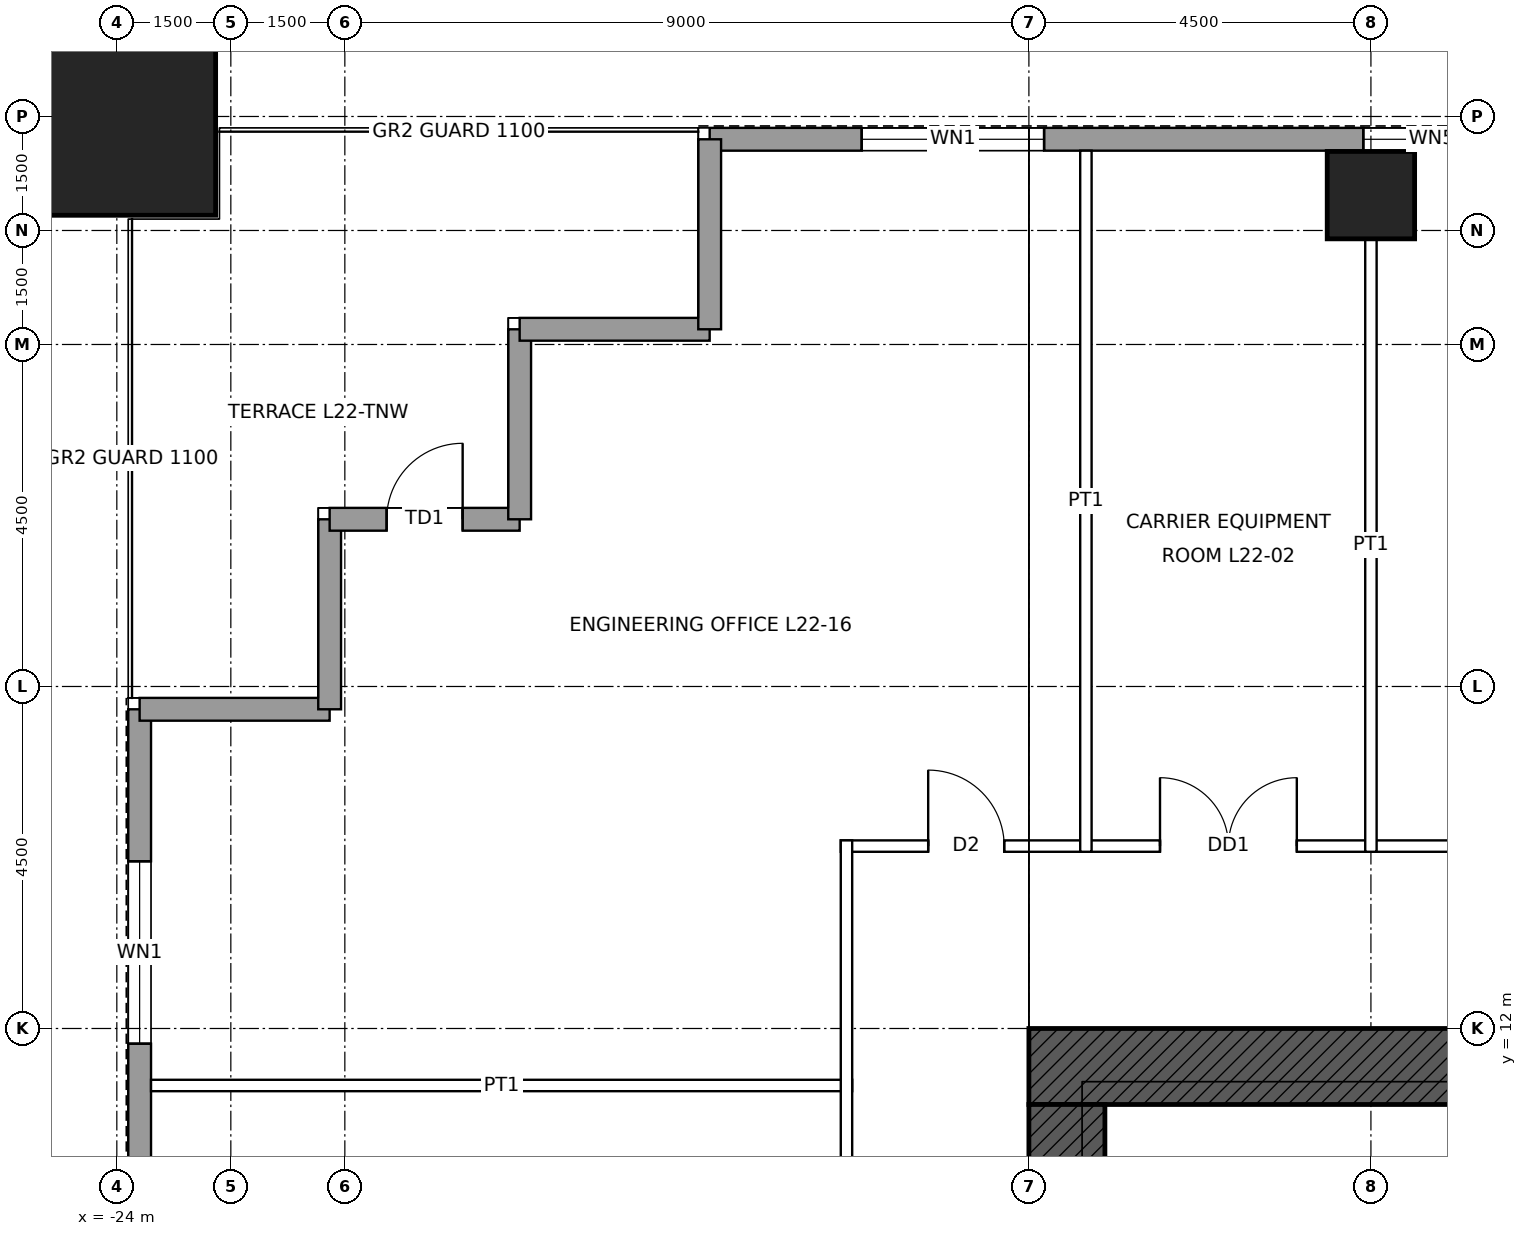
"""IFC4 building model, lengths in metres.
Left out: names, types, materials, properties, quantities, classifications, styles, units other than length and angle.
Written with IfcOpenShell. Run it as: python <this file> out.ifc"""

import sys

from ifc_helpers import new_model, si_unit, direction, frame, frame_2d, origin, origin_2d, place, context, subcontext, project, spatial, rectangle, hollow_rectangle, extrude, element, fill, save


model = new_model("IFC4")
c1 = context("Model", 3, precision=1e-05, world=origin(), true_north=direction((0.0, 1.0)))
c2 = subcontext(c1, "Body", "Model", "MODEL_VIEW")
j1 = project(units=[si_unit("LENGTHUNIT", "METRE"), si_unit("PLANEANGLEUNIT", "RADIAN")], contexts=[c1])
p1 = place(None, origin())
s1 = spatial("IfcSite", under=j1, at=p1, CompositionType="ELEMENT")
p2 = place(p1, origin())
s2 = spatial("IfcBuilding", under=s1, at=p2, CompositionType="ELEMENT")
p3 = place(p2, frame((0.0, 0.0, 113.4)))
s3 = spatial("IfcBuildingStorey", under=s2, at=p3, CompositionType="ELEMENT", Elevation=113.4)
p4 = place(p3, frame((-24.0, 24.0, 0.0), z_axis=(0.0, 0.0, 1.0), x_axis=(1.0, 0.0, 0.0)))
e1 = element("IfcColumn", 1, at=p4, inside=s3, PredefinedType="COLUMN", context=c2, shape_type="SweptSolid", body=[
    extrude(hollow_rectangle(XDim=2.6, YDim=2.6, WallThickness=0.13, at=origin_2d()), origin(), (0.0, 0.0, 1.0), 4.5),
])
p5 = place(p3, frame((-7.5, 22.965, 0.0), z_axis=(0.0, 0.0, 1.0), x_axis=(1.0, 0.0, 0.0)))
e2 = element("IfcColumn", 2, at=p5, inside=s3, PredefinedType="COLUMN", context=c2, shape_type="SweptSolid", body=[
    extrude(hollow_rectangle(XDim=1.15, YDim=1.15, WallThickness=0.075, at=origin_2d()), origin(), (0.0, 0.0, 1.0), 4.5),
])
p6 = place(p3, frame((-12.0, 11.5, 0.0), z_axis=(0.0, 0.0, 1.0), x_axis=(1.0, 0.0, 0.0)))
e3 = element("IfcWall", 3, at=p6, inside=s3, PredefinedType="SHEAR", context=c2, shape_type="SweptSolid", body=[
    extrude(rectangle(XDim=24.0, YDim=1.0, at=frame_2d((12.0, 0.0))), origin(), (0.0, 0.0, 1.0), 4.5),
])
p7 = place(p6, frame((6.25, 0.0, 0.0)))
e4 = element("IfcOpeningElement", 4, at=p7, cuts=e3, PredefinedType="OPENING", context=c2, shape_type="SweptSolid", body=[
    extrude(rectangle(XDim=1.0, YDim=2.4, at=frame_2d((0.5, 1.2))), frame((0.0, 0.51, 0.0), z_axis=(0.0, -1.0, 0.0), x_axis=(1.0, 0.0, 0.0)), (0.0, 0.0, 1.0), 1.02),
])
p8 = place(p6, frame((16.75, 0.0, 0.0)))
e5 = element("IfcOpeningElement", 5, at=p8, cuts=e3, PredefinedType="OPENING", context=c2, shape_type="SweptSolid", body=[
    extrude(rectangle(XDim=1.0, YDim=2.4, at=frame_2d((0.5, 1.2))), frame((0.0, 0.51, 0.0), z_axis=(0.0, -1.0, 0.0), x_axis=(1.0, 0.0, 0.0)), (0.0, 0.0, 1.0), 1.02),
])
p9 = place(p3, frame((-11.5, -11.0, 0.0), z_axis=(0.0, 0.0, 1.0), x_axis=(0.0, 1.0, 0.0)))
e6 = element("IfcWall", 6, at=p9, inside=s3, PredefinedType="SHEAR", context=c2, shape_type="SweptSolid", body=[
    extrude(rectangle(XDim=22.0, YDim=1.0, at=frame_2d((11.0, 0.0))), origin(), (0.0, 0.0, 1.0), 4.5),
])
p10 = place(p9, frame((10.5, 0.0, 0.0)))
e7 = element("IfcOpeningElement", 7, at=p10, cuts=e6, PredefinedType="OPENING", context=c2, shape_type="SweptSolid", body=[
    extrude(rectangle(XDim=1.0, YDim=2.4, at=frame_2d((0.5, 1.2))), frame((0.0, 0.51, 0.0), z_axis=(0.0, -1.0, 0.0), x_axis=(1.0, 0.0, 0.0)), (0.0, 0.0, 1.0), 1.02),
])
p11 = place(p3, frame((-16.2, 23.7, 0.0), z_axis=(0.0, 0.0, 1.0), x_axis=(1.0, 0.0, 0.0)))
e8 = element("IfcWall", 8, at=p11, inside=s3, PredefinedType="SOLIDWALL", context=c2, shape_type="SweptSolid", body=[
    extrude(rectangle(XDim=32.4, YDim=0.3, at=frame_2d((16.2, 0.0))), origin(), (0.0, 0.0, 1.0), 4.3),
])
p12 = place(p11, frame((2.0, 0.0, 1.0)))
e9 = element("IfcOpeningElement", 9, at=p12, cuts=e8, PredefinedType="OPENING", context=c2, shape_type="SweptSolid", body=[
    extrude(rectangle(XDim=2.4, YDim=1.2, at=frame_2d((1.2, 0.6))), frame((0.0, 0.16, 0.0), z_axis=(0.0, -1.0, 0.0), x_axis=(1.0, 0.0, 0.0)), (0.0, 0.0, 1.0), 0.32),
])
p13 = place(p11, frame((8.6, 0.0, 1.0)))
e10 = element("IfcOpeningElement", 10, at=p13, cuts=e8, PredefinedType="OPENING", context=c2, shape_type="SweptSolid", body=[
    extrude(rectangle(XDim=1.8, YDim=1.2, at=frame_2d((0.9, 0.6))), frame((0.0, 0.16, 0.0), z_axis=(0.0, -1.0, 0.0), x_axis=(1.0, 0.0, 0.0)), (0.0, 0.0, 1.0), 0.32),
])
p14 = place(p11, frame((10.7, 0.0, 1.0)))
e11 = element("IfcOpeningElement", 11, at=p14, cuts=e8, PredefinedType="OPENING", context=c2, shape_type="SweptSolid", body=[
    extrude(rectangle(XDim=2.4, YDim=1.2, at=frame_2d((1.2, 0.6))), frame((0.0, 0.16, 0.0), z_axis=(0.0, -1.0, 0.0), x_axis=(1.0, 0.0, 0.0)), (0.0, 0.0, 1.0), 0.32),
])
p15 = place(p11, frame((13.4, 0.0, 1.0)))
e12 = element("IfcOpeningElement", 12, at=p15, cuts=e8, PredefinedType="OPENING", context=c2, shape_type="SweptSolid", body=[
    extrude(rectangle(XDim=2.4, YDim=1.2, at=frame_2d((1.2, 0.6))), frame((0.0, 0.16, 0.0), z_axis=(0.0, -1.0, 0.0), x_axis=(1.0, 0.0, 0.0)), (0.0, 0.0, 1.0), 0.32),
])
p16 = place(p11, frame((16.6, 0.0, 1.0)))
e13 = element("IfcOpeningElement", 13, at=p16, cuts=e8, PredefinedType="OPENING", context=c2, shape_type="SweptSolid", body=[
    extrude(rectangle(XDim=2.4, YDim=1.2, at=frame_2d((1.2, 0.6))), frame((0.0, 0.16, 0.0), z_axis=(0.0, -1.0, 0.0), x_axis=(1.0, 0.0, 0.0)), (0.0, 0.0, 1.0), 0.32),
])
p17 = place(p11, frame((19.3, 0.0, 1.0)))
e14 = element("IfcOpeningElement", 14, at=p17, cuts=e8, PredefinedType="OPENING", context=c2, shape_type="SweptSolid", body=[
    extrude(rectangle(XDim=2.4, YDim=1.2, at=frame_2d((1.2, 0.6))), frame((0.0, 0.16, 0.0), z_axis=(0.0, -1.0, 0.0), x_axis=(1.0, 0.0, 0.0)), (0.0, 0.0, 1.0), 0.32),
])
p18 = place(p11, frame((22.0, 0.0, 1.0)))
e15 = element("IfcOpeningElement", 15, at=p18, cuts=e8, PredefinedType="OPENING", context=c2, shape_type="SweptSolid", body=[
    extrude(rectangle(XDim=1.8, YDim=1.2, at=frame_2d((0.9, 0.6))), frame((0.0, 0.16, 0.0), z_axis=(0.0, -1.0, 0.0), x_axis=(1.0, 0.0, 0.0)), (0.0, 0.0, 1.0), 0.32),
])
p19 = place(p11, frame((28.0, 0.0, 1.0)))
e16 = element("IfcOpeningElement", 16, at=p19, cuts=e8, PredefinedType="OPENING", context=c2, shape_type="SweptSolid", body=[
    extrude(rectangle(XDim=2.4, YDim=1.2, at=frame_2d((1.2, 0.6))), frame((0.0, 0.16, 0.0), z_axis=(0.0, -1.0, 0.0), x_axis=(1.0, 0.0, 0.0)), (0.0, 0.0, 1.0), 0.32),
])
p20 = place(p3, frame((-23.7, -16.2, 0.0), z_axis=(0.0, 0.0, 1.0), x_axis=(0.0, 1.0, 0.0)))
e17 = element("IfcWall", 17, at=p20, inside=s3, PredefinedType="SOLIDWALL", context=c2, shape_type="SweptSolid", body=[
    extrude(rectangle(XDim=32.4, YDim=0.3, at=frame_2d((16.2, 0.0))), origin(), (0.0, 0.0, 1.0), 4.3),
])
p21 = place(p20, frame((0.65, 0.0, 1.0)))
e18 = element("IfcOpeningElement", 18, at=p21, cuts=e17, PredefinedType="OPENING", context=c2, shape_type="SweptSolid", body=[
    extrude(rectangle(XDim=1.8, YDim=1.2, at=frame_2d((0.9, 0.6))), frame((0.0, 0.16, 0.0), z_axis=(0.0, -1.0, 0.0), x_axis=(1.0, 0.0, 0.0)), (0.0, 0.0, 1.0), 0.32),
])
p22 = place(p20, frame((2.75, 0.0, 1.0)))
e19 = element("IfcOpeningElement", 19, at=p22, cuts=e17, PredefinedType="OPENING", context=c2, shape_type="SweptSolid", body=[
    extrude(rectangle(XDim=1.8, YDim=1.2, at=frame_2d((0.9, 0.6))), frame((0.0, 0.16, 0.0), z_axis=(0.0, -1.0, 0.0), x_axis=(1.0, 0.0, 0.0)), (0.0, 0.0, 1.0), 0.32),
])
p23 = place(p20, frame((9.5, 0.0, 1.0)))
e20 = element("IfcOpeningElement", 20, at=p23, cuts=e17, PredefinedType="OPENING", context=c2, shape_type="SweptSolid", body=[
    extrude(rectangle(XDim=2.4, YDim=1.2, at=frame_2d((1.2, 0.6))), frame((0.0, 0.16, 0.0), z_axis=(0.0, -1.0, 0.0), x_axis=(1.0, 0.0, 0.0)), (0.0, 0.0, 1.0), 0.32),
])
p24 = place(p20, frame((13.0, 0.0, 1.0)))
e21 = element("IfcOpeningElement", 21, at=p24, cuts=e17, PredefinedType="OPENING", context=c2, shape_type="SweptSolid", body=[
    extrude(rectangle(XDim=2.4, YDim=1.2, at=frame_2d((1.2, 0.6))), frame((0.0, 0.16, 0.0), z_axis=(0.0, -1.0, 0.0), x_axis=(1.0, 0.0, 0.0)), (0.0, 0.0, 1.0), 0.32),
])
p25 = place(p20, frame((16.6, 0.0, 1.0)))
e22 = element("IfcOpeningElement", 22, at=p25, cuts=e17, PredefinedType="OPENING", context=c2, shape_type="SweptSolid", body=[
    extrude(rectangle(XDim=2.4, YDim=1.2, at=frame_2d((1.2, 0.6))), frame((0.0, 0.16, 0.0), z_axis=(0.0, -1.0, 0.0), x_axis=(1.0, 0.0, 0.0)), (0.0, 0.0, 1.0), 0.32),
])
p26 = place(p20, frame((19.3, 0.0, 1.0)))
e23 = element("IfcOpeningElement", 23, at=p26, cuts=e17, PredefinedType="OPENING", context=c2, shape_type="SweptSolid", body=[
    extrude(rectangle(XDim=2.4, YDim=1.2, at=frame_2d((1.2, 0.6))), frame((0.0, 0.16, 0.0), z_axis=(0.0, -1.0, 0.0), x_axis=(1.0, 0.0, 0.0)), (0.0, 0.0, 1.0), 0.32),
])
p27 = place(p20, frame((22.0, 0.0, 1.0)))
e24 = element("IfcOpeningElement", 24, at=p27, cuts=e17, PredefinedType="OPENING", context=c2, shape_type="SweptSolid", body=[
    extrude(rectangle(XDim=1.8, YDim=1.2, at=frame_2d((0.9, 0.6))), frame((0.0, 0.16, 0.0), z_axis=(0.0, -1.0, 0.0), x_axis=(1.0, 0.0, 0.0)), (0.0, 0.0, 1.0), 0.32),
])
p28 = place(p20, frame((28.0, 0.0, 1.0)))
e25 = element("IfcOpeningElement", 25, at=p28, cuts=e17, PredefinedType="OPENING", context=c2, shape_type="SweptSolid", body=[
    extrude(rectangle(XDim=2.4, YDim=1.2, at=frame_2d((1.2, 0.6))), frame((0.0, 0.16, 0.0), z_axis=(0.0, -1.0, 0.0), x_axis=(1.0, 0.0, 0.0)), (0.0, 0.0, 1.0), 0.32),
])
for number, where, z_axis, x_axis in (
    (26, (-23.7, 16.2, 0.0), (0.0, 0.0, 1.0), (1.0, 0.0, 0.0)),
    (27, (-21.2, 16.2, 0.0), (0.0, 0.0, 1.0), (0.0, 1.0, 0.0)),
):
    element("IfcWall", number, at=place(p3, frame(where, z_axis=z_axis, x_axis=x_axis)), inside=s3, PredefinedType="SOLIDWALL", context=c2, shape_type="SweptSolid", body=[
        extrude(rectangle(XDim=2.5, YDim=0.3, at=frame_2d((1.25, 0.0))), origin(), (0.0, 0.0, 1.0), 4.3),
    ])
p29 = place(p3, frame((-21.2, 18.7, 0.0), z_axis=(0.0, 0.0, 1.0), x_axis=(1.0, 0.0, 0.0)))
e28 = element("IfcWall", 28, at=p29, inside=s3, PredefinedType="SOLIDWALL", context=c2, shape_type="SweptSolid", body=[
    extrude(rectangle(XDim=2.5, YDim=0.3, at=frame_2d((1.25, 0.0))), origin(), (0.0, 0.0, 1.0), 4.3),
])
p30 = place(p29, frame((0.75, 0.0, 0.0)))
e29 = element("IfcOpeningElement", 29, at=p30, cuts=e28, PredefinedType="OPENING", context=c2, shape_type="SweptSolid", body=[
    extrude(rectangle(XDim=1.0, YDim=2.4, at=frame_2d((0.5, 1.2))), frame((0.0, 0.16, 0.0), z_axis=(0.0, -1.0, 0.0), x_axis=(1.0, 0.0, 0.0)), (0.0, 0.0, 1.0), 0.32),
])
for number, where, z_axis, x_axis in (
    (30, (-18.7, 18.7, 0.0), (0.0, 0.0, 1.0), (0.0, 1.0, 0.0)),
    (31, (-18.7, 21.2, 0.0), (0.0, 0.0, 1.0), (1.0, 0.0, 0.0)),
    (32, (-16.2, 21.2, 0.0), (0.0, 0.0, 1.0), (0.0, 1.0, 0.0)),
):
    element("IfcWall", number, at=place(p3, frame(where, z_axis=z_axis, x_axis=x_axis)), inside=s3, PredefinedType="SOLIDWALL", context=c2, shape_type="SweptSolid", body=[
        extrude(rectangle(XDim=2.5, YDim=0.3, at=frame_2d((1.25, 0.0))), origin(), (0.0, 0.0, 1.0), 4.3),
    ])
p31 = place(p3, frame((-23.55, 11.25, 0.0), z_axis=(0.0, 0.0, 1.0), x_axis=(1.0, 0.0, 0.0)))
e33 = element("IfcWall", 33, at=p31, inside=s3, PredefinedType="PARTITIONING", context=c2, shape_type="SweptSolid", body=[
    extrude(rectangle(XDim=9.225, YDim=0.15, at=frame_2d((4.613, 0.0))), origin(), (0.0, 0.0, 1.0), 3.431),
])
p32 = place(p3, frame((-14.475, 14.4, 0.0), z_axis=(0.0, 0.0, 1.0), x_axis=(1.0, 0.0, 0.0)))
e34 = element("IfcWall", 34, at=p32, inside=s3, PredefinedType="PARTITIONING", context=c2, shape_type="SweptSolid", body=[
    extrude(rectangle(XDim=28.95, YDim=0.15, at=frame_2d((14.475, 0.0))), origin(), (0.0, 0.0, 1.0), 4.3),
])
p33 = place(p32, frame((4.2, 0.0, 0.0)))
e35 = element("IfcOpeningElement", 35, at=p33, cuts=e34, PredefinedType="OPENING", context=c2, shape_type="SweptSolid", body=[
    extrude(rectangle(XDim=1.8, YDim=2.4, at=frame_2d((0.9, 1.2))), frame((0.0, 0.085, 0.0), z_axis=(0.0, -1.0, 0.0), x_axis=(1.0, 0.0, 0.0)), (0.0, 0.0, 1.0), 0.17),
])
p34 = place(p32, frame((9.825, 0.0, 0.0)))
e36 = element("IfcOpeningElement", 36, at=p34, cuts=e34, PredefinedType="OPENING", context=c2, shape_type="SweptSolid", body=[
    extrude(rectangle(XDim=1.8, YDim=2.4, at=frame_2d((0.9, 1.2))), frame((0.0, 0.085, 0.0), z_axis=(0.0, -1.0, 0.0), x_axis=(1.0, 0.0, 0.0)), (0.0, 0.0, 1.0), 0.17),
])
p35 = place(p32, frame((17.325, 0.0, 0.0)))
e37 = element("IfcOpeningElement", 37, at=p35, cuts=e34, PredefinedType="OPENING", context=c2, shape_type="SweptSolid", body=[
    extrude(rectangle(XDim=1.8, YDim=2.4, at=frame_2d((0.9, 1.2))), frame((0.0, 0.085, 0.0), z_axis=(0.0, -1.0, 0.0), x_axis=(1.0, 0.0, 0.0)), (0.0, 0.0, 1.0), 0.17),
])
p36 = place(p32, frame((22.95, 0.0, 0.0)))
e38 = element("IfcOpeningElement", 38, at=p36, cuts=e34, PredefinedType="OPENING", context=c2, shape_type="SweptSolid", body=[
    extrude(rectangle(XDim=1.8, YDim=2.4, at=frame_2d((0.9, 1.2))), frame((0.0, 0.085, 0.0), z_axis=(0.0, -1.0, 0.0), x_axis=(1.0, 0.0, 0.0)), (0.0, 0.0, 1.0), 0.17),
])
p37 = place(p32, frame((26.8, 0.0, 0.0)))
e39 = element("IfcOpeningElement", 39, at=p37, cuts=e34, PredefinedType="OPENING", context=c2, shape_type="SweptSolid", body=[
    extrude(rectangle(XDim=1.0, YDim=2.1, at=frame_2d((0.5, 1.05))), frame((0.0, 0.085, 0.0), z_axis=(0.0, -1.0, 0.0), x_axis=(1.0, 0.0, 0.0)), (0.0, 0.0, 1.0), 0.17),
])
p38 = place(p32, frame((1.15, 0.0, 0.0)))
e40 = element("IfcOpeningElement", 40, at=p38, cuts=e34, PredefinedType="OPENING", context=c2, shape_type="SweptSolid", body=[
    extrude(rectangle(XDim=1.0, YDim=2.1, at=frame_2d((0.5, 1.05))), frame((0.0, 0.085, 0.0), z_axis=(0.0, -1.0, 0.0), x_axis=(1.0, 0.0, 0.0)), (0.0, 0.0, 1.0), 0.17),
])
p39 = place(p3, frame((-14.4, -14.475, 0.0), z_axis=(0.0, 0.0, 1.0), x_axis=(0.0, 1.0, 0.0)))
e41 = element("IfcWall", 41, at=p39, inside=s3, PredefinedType="PARTITIONING", context=c2, shape_type="SweptSolid", body=[
    extrude(rectangle(XDim=28.95, YDim=0.15, at=frame_2d((14.475, 0.0))), origin(), (0.0, 0.0, 1.0), 4.3),
])
p40 = place(p39, frame((6.075, 0.0, 0.0)))
e42 = element("IfcOpeningElement", 42, at=p40, cuts=e41, PredefinedType="OPENING", context=c2, shape_type="SweptSolid", body=[
    extrude(rectangle(XDim=1.8, YDim=2.4, at=frame_2d((0.9, 1.2))), frame((0.0, 0.085, 0.0), z_axis=(0.0, -1.0, 0.0), x_axis=(1.0, 0.0, 0.0)), (0.0, 0.0, 1.0), 0.17),
])
p41 = place(p39, frame((17.325, 0.0, 0.0)))
e43 = element("IfcOpeningElement", 43, at=p41, cuts=e41, PredefinedType="OPENING", context=c2, shape_type="SweptSolid", body=[
    extrude(rectangle(XDim=1.8, YDim=2.4, at=frame_2d((0.9, 1.2))), frame((0.0, 0.085, 0.0), z_axis=(0.0, -1.0, 0.0), x_axis=(1.0, 0.0, 0.0)), (0.0, 0.0, 1.0), 0.17),
])
p42 = place(p3, frame((-11.25, 14.325, 0.0), z_axis=(0.0, 0.0, 1.0), x_axis=(0.0, 1.0, 0.0)))
e44 = element("IfcWall", 44, at=p42, inside=s3, PredefinedType="PARTITIONING", context=c2, shape_type="SweptSolid", body=[
    extrude(rectangle(XDim=9.225, YDim=0.15, at=frame_2d((4.613, 0.0))), origin(), (0.0, 0.0, 1.0), 3.431),
])
p43 = place(p3, frame((-7.5, 14.325, 0.0), z_axis=(0.0, 0.0, 1.0), x_axis=(0.0, 1.0, 0.0)))
e45 = element("IfcWall", 45, at=p43, inside=s3, PredefinedType="PARTITIONING", context=c2, shape_type="SweptSolid", body=[
    extrude(rectangle(XDim=8.065, YDim=0.15, at=frame_2d((4.032, 0.0))), origin(), (0.0, 0.0, 1.0), 3.431),
])
p44 = place(p12, origin())
e46 = element("IfcWindow", 46, at=p44, inside=s3, PartitioningType="SINGLE_PANEL", PredefinedType="WINDOW", context=c2, shape_type="SweptSolid", body=[
    extrude(rectangle(XDim=2.4, YDim=1.2, at=frame_2d((1.2, 0.6))), frame((0.0, 0.03, 0.0), z_axis=(0.0, -1.0, 0.0), x_axis=(1.0, 0.0, 0.0)), (0.0, 0.0, 1.0), 0.06),
])
fill(e9, e46)
p45 = place(p13, origin())
e47 = element("IfcWindow", 47, at=p45, inside=s3, PartitioningType="SINGLE_PANEL", PredefinedType="WINDOW", context=c2, shape_type="SweptSolid", body=[
    extrude(rectangle(XDim=1.8, YDim=1.2, at=frame_2d((0.9, 0.6))), frame((0.0, 0.03, 0.0), z_axis=(0.0, -1.0, 0.0), x_axis=(1.0, 0.0, 0.0)), (0.0, 0.0, 1.0), 0.06),
])
fill(e10, e47)
p46 = place(p28, origin())
e48 = element("IfcWindow", 48, at=p46, inside=s3, PartitioningType="SINGLE_PANEL", PredefinedType="WINDOW", context=c2, shape_type="SweptSolid", body=[
    extrude(rectangle(XDim=2.4, YDim=1.2, at=frame_2d((1.2, 0.6))), frame((0.0, 0.03, 0.0), z_axis=(0.0, -1.0, 0.0), x_axis=(1.0, 0.0, 0.0)), (0.0, 0.0, 1.0), 0.06),
])
fill(e25, e48)
p47 = place(p30, origin())
e49 = element("IfcDoor", 49, at=p47, inside=s3, OperationType="SINGLE_SWING_RIGHT", PredefinedType="DOOR", context=c2, shape_type="SweptSolid", body=[
    extrude(rectangle(XDim=1.0, YDim=2.4, at=frame_2d((0.5, 1.2))), frame((0.0, 0.025, 0.0), z_axis=(0.0, -1.0, 0.0), x_axis=(1.0, 0.0, 0.0)), (0.0, 0.0, 1.0), 0.05),
])
fill(e29, e49)
p48 = place(p33, origin())
e50 = element("IfcDoor", 50, at=p48, inside=s3, OperationType="DOUBLE_DOOR_SINGLE_SWING", PredefinedType="DOOR", context=c2, shape_type="SweptSolid", body=[
    extrude(rectangle(XDim=1.8, YDim=2.4, at=frame_2d((0.9, 1.2))), frame((0.0, 0.025, 0.0), z_axis=(0.0, -1.0, 0.0), x_axis=(1.0, 0.0, 0.0)), (0.0, 0.0, 1.0), 0.05),
])
fill(e35, e50)
p49 = place(p38, origin())
e51 = element("IfcDoor", 51, at=p49, inside=s3, OperationType="SINGLE_SWING_LEFT", PredefinedType="DOOR", context=c2, shape_type="SweptSolid", body=[
    extrude(rectangle(XDim=1.0, YDim=2.1, at=frame_2d((0.5, 1.05))), frame((0.0, 0.025, 0.0), z_axis=(0.0, -1.0, 0.0), x_axis=(1.0, 0.0, 0.0)), (0.0, 0.0, 1.0), 0.05),
])
fill(e40, e51)
save(model, sys.argv[1])
